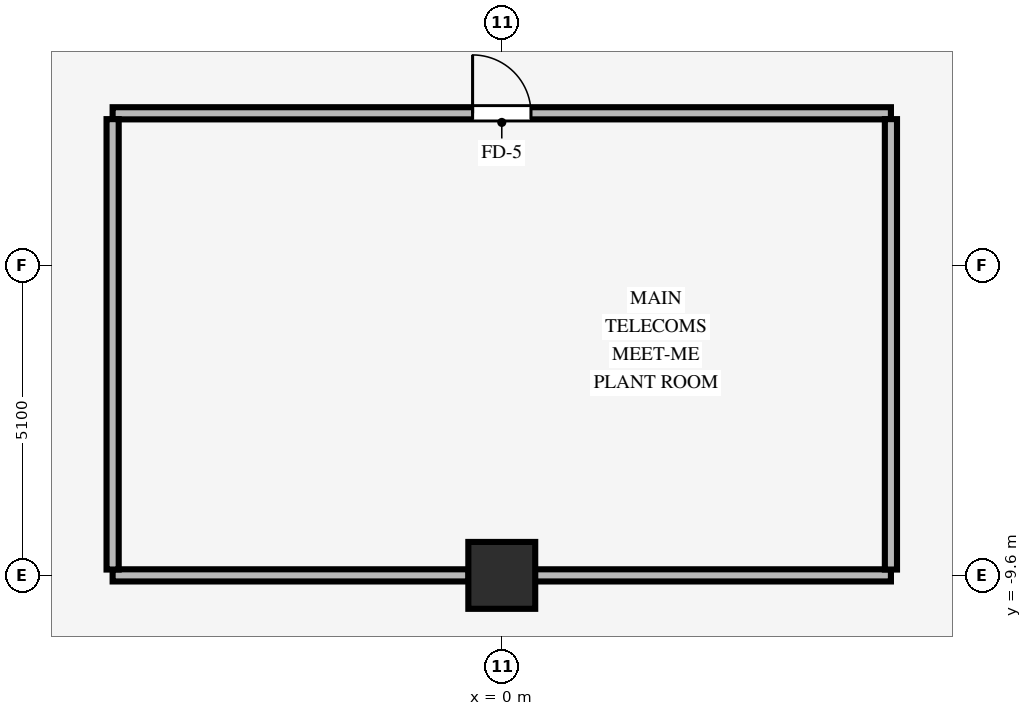
"""IFC4 building model, lengths in metres.
Left out: names, types, materials, properties, quantities, classifications, styles, units other than length and angle.
Written with IfcOpenShell. Run it as: python <this file> out.ifc"""

import sys

from ifc_helpers import new_model, si_unit, direction, frame, frame_2d, origin, origin_2d, place, context, subcontext, project, spatial, rectangle, extrude, source, transform, mapped, element, fill, save


model = new_model("IFC4")
c1 = context("Model", 3, precision=1e-05, world=origin(), true_north=direction((0.0, 1.0)))
c2 = subcontext(c1, "Body", "Model", "MODEL_VIEW")
j1 = project(units=[si_unit("LENGTHUNIT", "METRE"), si_unit("PLANEANGLEUNIT", "RADIAN")], contexts=[c1])
p1 = place(None, origin())
s1 = spatial("IfcSite", under=j1, at=p1, CompositionType="ELEMENT")
p2 = place(p1, origin())
s2 = spatial("IfcBuilding", under=s1, at=p2, CompositionType="ELEMENT")
p3 = place(p2, frame((0.0, 0.0, -4.2)))
s3 = spatial("IfcBuildingStorey", under=s2, at=p3, CompositionType="ELEMENT", Elevation=-4.2)
p4 = place(p3, frame((0.0, -9.6, 0.0), z_axis=(0.0, 0.0, 1.0), x_axis=(1.0, 0.0, 0.0)))
e1 = element("IfcColumn", 1, at=p4, inside=s3, PredefinedType="COLUMN", context=c2, shape_type="SweptSolid", body=[
    extrude(rectangle(XDim=1.1, YDim=1.1, at=origin_2d()), origin(), (0.0, 0.0, 1.0), 3.88),
])
for number, where, z_axis, x_axis in (
    (2, (-6.4, -9.6, 0.0), (0.0, 0.0, 1.0), (1.0, 0.0, 0.0)),
    (3, (0.546, -9.6, 0.0), (0.0, 0.0, 1.0), (1.0, 0.0, 0.0)),
):
    element("IfcWall", number, at=place(p3, frame(where, z_axis=z_axis, x_axis=x_axis)), inside=s3, PredefinedType="STANDARD", context=c2, shape_type="SweptSolid", body=[
        extrude(rectangle(XDim=5.854, YDim=0.2, at=frame_2d((2.927, 0.0))), origin(), (0.0, 0.0, 1.0), 3.235),
    ])
p5 = place(p3, frame((-6.4, -2.0, 0.0), z_axis=(0.0, 0.0, 1.0), x_axis=(1.0, 0.0, 0.0)))
e4 = element("IfcWall", 4, at=p5, inside=s3, PredefinedType="STANDARD", context=c2, shape_type="SweptSolid", body=[
    extrude(rectangle(XDim=12.8, YDim=0.2, at=frame_2d((6.4, 0.0))), origin(), (0.0, 0.0, 1.0), 3.87),
])
p6 = place(p5, frame((5.92, 0.0, 0.0)))
e5 = element("IfcOpeningElement", 5, at=p6, cuts=e4, PredefinedType="OPENING", context=c2, shape_type="SweptSolid", body=[
    extrude(rectangle(XDim=0.96, YDim=2.1, at=frame_2d((0.48, 1.05))), frame((0.0, 0.11, 0.0), z_axis=(0.0, -1.0, 0.0), x_axis=(1.0, 0.0, 0.0)), (0.0, 0.0, 1.0), 0.22),
])
for number, where, z_axis, x_axis in (
    (6, (-6.4, -9.504, 0.0), (0.0, 0.0, 1.0), (0.0, 1.0, 0.0)),
    (7, (6.4, -9.504, 0.0), (0.0, 0.0, 1.0), (0.0, 1.0, 0.0)),
):
    element("IfcWall", number, at=place(p3, frame(where, z_axis=z_axis, x_axis=x_axis)), inside=s3, PredefinedType="STANDARD", context=c2, shape_type="SweptSolid", body=[
        extrude(rectangle(XDim=7.408, YDim=0.2, at=frame_2d((3.704, 0.0))), origin(), (0.0, 0.0, 1.0), 3.87),
    ])
m1 = source(origin(), c2, "Body", "SweptSolid", [
    extrude(rectangle(XDim=0.96, YDim=2.1, at=frame_2d((0.48, 1.05))), frame((0.0, 0.025, 0.0), z_axis=(0.0, -1.0, 0.0), x_axis=(1.0, 0.0, 0.0)), (0.0, 0.0, 1.0), 0.05),
])
p7 = place(p6, origin())
e8 = element("IfcDoor", 8, at=p7, inside=s3, OperationType="SINGLE_SWING_LEFT", PredefinedType="DOOR", context=c2, shape_type="MappedRepresentation", body=[
    mapped(m1, transform((0.0, 0.0, 0.0), scale=1.0)),
])
fill(e5, e8)
save(model, sys.argv[1])
